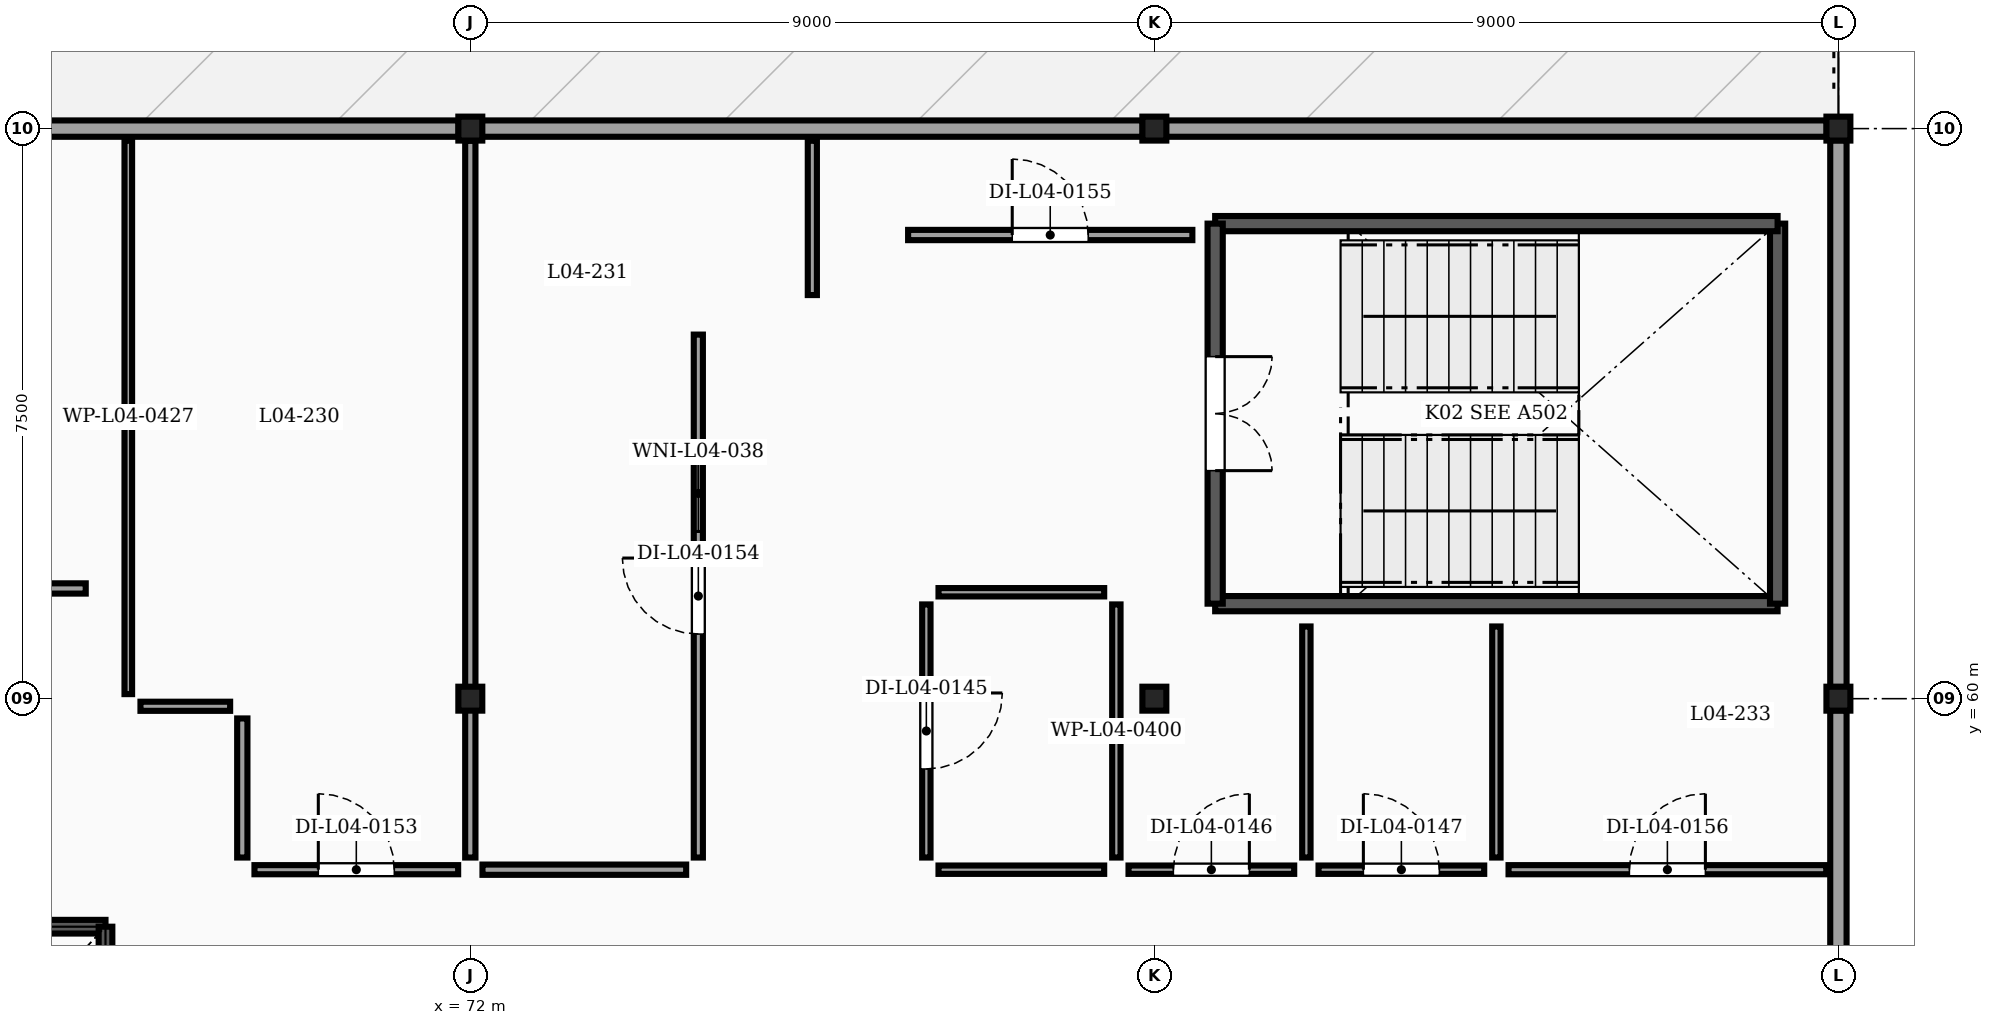
"""IFC4 building model, lengths in metres.
Left out: names, types, materials, properties, quantities, classifications, styles, units other than length and angle.
Written with IfcOpenShell. Run it as: python <this file> out.ifc"""

import sys

from ifc_helpers import new_model, si_unit, direction, frame, frame_2d, origin, origin_2d, place, context, subcontext, project, spatial, rectangle, extrude, element, fill, save


model = new_model("IFC4")
c1 = context("Model", 3, precision=1e-05, world=origin(), true_north=direction((0.0, 1.0)))
c2 = subcontext(c1, "Body", "Model", "MODEL_VIEW")
j1 = project(units=[si_unit("LENGTHUNIT", "METRE"), si_unit("PLANEANGLEUNIT", "RADIAN")], contexts=[c1])
p1 = place(None, origin())
s1 = spatial("IfcSite", under=j1, at=p1, CompositionType="ELEMENT")
p2 = place(p1, origin())
s2 = spatial("IfcBuilding", under=s1, at=p2, CompositionType="ELEMENT")
p3 = place(p2, frame((0.0, 0.0, 16.1)))
s3 = spatial("IfcBuildingStorey", under=s2, at=p3, CompositionType="ELEMENT", Elevation=16.1)
for number, where, z_axis, x_axis in (
    (1, (72.0, 60.0, 0.0), (0.0, 0.0, 1.0), (1.0, 0.0, 0.0)),
    (2, (81.0, 60.0, 0.0), (0.0, 0.0, 1.0), (1.0, 0.0, 0.0)),
    (3, (90.0, 60.0, 0.0), (0.0, 0.0, 1.0), (1.0, 0.0, 0.0)),
    (4, (72.0, 67.5, 0.0), (0.0, 0.0, 1.0), (1.0, 0.0, 0.0)),
    (5, (81.0, 67.5, 0.0), (0.0, 0.0, 1.0), (1.0, 0.0, 0.0)),
    (6, (90.0, 67.5, 0.0), (0.0, 0.0, 1.0), (1.0, 0.0, 0.0)),
):
    element("IfcColumn", number, at=place(p3, frame(where, z_axis=z_axis, x_axis=x_axis)), inside=s3, PredefinedType="COLUMN", context=c2, shape_type="SweptSolid", body=[
        extrude(rectangle(XDim=0.315, YDim=0.315, at=origin_2d()), origin(), (0.0, 0.0, 1.0), 3.8),
    ])
p4 = place(p3, frame((63.154, 67.5, 0.0), z_axis=(0.0, 0.0, 1.0), x_axis=(1.0, 0.0, 0.0)))
e7 = element("IfcWall", 7, at=p4, inside=s3, PredefinedType="SOLIDWALL", context=c2, shape_type="SweptSolid", body=[
    extrude(rectangle(XDim=8.693, YDim=0.215, at=frame_2d((4.346, 0.0))), origin(), (0.0, 0.0, 1.0), 3.017),
])
p5 = place(p4, frame((1.336, 0.0, 0.0)))
e8 = element("IfcOpeningElement", 8, at=p5, cuts=e7, PredefinedType="OPENING", context=c2, shape_type="SweptSolid", body=[
    extrude(rectangle(XDim=1.5, YDim=2.15, at=frame_2d((0.75, 1.075))), frame((0.0, 0.117, 0.0), z_axis=(0.0, -1.0, 0.0), x_axis=(1.0, 0.0, 0.0)), (0.0, 0.0, 1.0), 0.235),
])
for number, where, z_axis, x_axis in (
    (9, (72.154, 67.5, 0.0), (0.0, 0.0, 1.0), (1.0, 0.0, 0.0)),
    (10, (81.154, 67.5, 0.0), (0.0, 0.0, 1.0), (1.0, 0.0, 0.0)),
):
    element("IfcWall", number, at=place(p3, frame(where, z_axis=z_axis, x_axis=x_axis)), inside=s3, PredefinedType="SOLIDWALL", context=c2, shape_type="SweptSolid", body=[
        extrude(rectangle(XDim=8.693, YDim=0.215, at=frame_2d((4.346, 0.0))), origin(), (0.0, 0.0, 1.0), 3.017),
    ])
for number, where, z_axis, x_axis in (
    (11, (90.0, 67.346, 0.0), (0.0, 0.0, 1.0), (0.0, -1.0, 0.0)),
    (12, (90.0, 59.846, 0.0), (0.0, 0.0, 1.0), (0.0, -1.0, 0.0)),
):
    element("IfcWall", number, at=place(p3, frame(where, z_axis=z_axis, x_axis=x_axis)), inside=s3, PredefinedType="SOLIDWALL", context=c2, shape_type="SweptSolid", body=[
        extrude(rectangle(XDim=7.193, YDim=0.215, at=frame_2d((3.596, 0.0))), origin(), (0.0, 0.0, 1.0), 3.017),
    ])
p6 = place(p3, frame((81.8, 61.25, 0.0), z_axis=(0.0, 0.0, 1.0), x_axis=(1.0, 0.0, 0.0)))
e13 = element("IfcWall", 13, at=p6, inside=s3, PredefinedType="SHEAR", context=c2, shape_type="SweptSolid", body=[
    extrude(rectangle(XDim=7.4, YDim=0.2, at=frame_2d((3.7, 0.0))), origin(), (0.0, 0.0, 1.0), 3.61),
])
p7 = place(p3, frame((89.2, 61.25, 0.0), z_axis=(0.0, 0.0, 1.0), x_axis=(0.0, 1.0, 0.0)))
e14 = element("IfcWall", 14, at=p7, inside=s3, PredefinedType="SHEAR", context=c2, shape_type="SweptSolid", body=[
    extrude(rectangle(XDim=5.0, YDim=0.2, at=frame_2d((2.5, 0.0))), origin(), (0.0, 0.0, 1.0), 3.61),
])
p8 = place(p3, frame((89.2, 66.25, 0.0), z_axis=(0.0, 0.0, 1.0), x_axis=(-1.0, 0.0, 0.0)))
e15 = element("IfcWall", 15, at=p8, inside=s3, PredefinedType="SHEAR", context=c2, shape_type="SweptSolid", body=[
    extrude(rectangle(XDim=7.4, YDim=0.2, at=frame_2d((3.7, 0.0))), origin(), (0.0, 0.0, 1.0), 3.61),
])
p9 = place(p3, frame((81.8, 66.25, 0.0), z_axis=(0.0, 0.0, 1.0), x_axis=(0.0, -1.0, 0.0)))
e16 = element("IfcWall", 16, at=p9, inside=s3, PredefinedType="SHEAR", context=c2, shape_type="SweptSolid", body=[
    extrude(rectangle(XDim=5.0, YDim=0.2, at=frame_2d((2.5, 0.0))), origin(), (0.0, 0.0, 1.0), 3.61),
])
p10 = place(p9, frame((1.75, 0.0, 0.0)))
e17 = element("IfcOpeningElement", 17, at=p10, cuts=e16, PredefinedType="OPENING", context=c2, shape_type="SweptSolid", body=[
    extrude(rectangle(XDim=1.5, YDim=2.15, at=frame_2d((0.75, 1.075))), frame((0.0, 0.11, 0.0), z_axis=(0.0, -1.0, 0.0), x_axis=(1.0, 0.0, 0.0)), (0.0, 0.0, 1.0), 0.22),
])
p11 = place(p3, frame((64.4, 57.0, 0.0), z_axis=(0.0, 0.0, 1.0), x_axis=(1.0, 0.0, 0.0)))
e18 = element("IfcWall", 18, at=p11, inside=s3, PredefinedType="SHEAR", context=c2, shape_type="SweptSolid", body=[
    extrude(rectangle(XDim=2.8, YDim=0.18, at=frame_2d((1.4, 0.0))), origin(), (0.0, 0.0, 1.0), 3.61),
])
p12 = place(p11, frame((0.85, 0.0, 0.0)))
e19 = element("IfcOpeningElement", 19, at=p12, cuts=e18, PredefinedType="OPENING", context=c2, shape_type="SweptSolid", body=[
    extrude(rectangle(XDim=1.1, YDim=2.15, at=frame_2d((0.55, 1.075))), frame((0.0, 0.1, 0.0), z_axis=(0.0, -1.0, 0.0), x_axis=(1.0, 0.0, 0.0)), (0.0, 0.0, 1.0), 0.2),
])
p13 = place(p3, frame((67.2, 57.0, 0.0), z_axis=(0.0, 0.0, 1.0), x_axis=(0.0, -1.0, 0.0)))
e20 = element("IfcWall", 20, at=p13, inside=s3, PredefinedType="SHEAR", context=c2, shape_type="SweptSolid", body=[
    extrude(rectangle(XDim=3.0, YDim=0.18, at=frame_2d((1.5, 0.0))), origin(), (0.0, 0.0, 1.0), 3.61),
])
p14 = place(p3, frame((80.5, 57.91, 0.0), z_axis=(0.0, 0.0, 1.0), x_axis=(0.0, 1.0, 0.0)))
e21 = element("IfcWall", 21, at=p14, inside=s3, PredefinedType="PARTITIONING", context=c2, shape_type="SweptSolid", body=[
    extrude(rectangle(XDim=3.33, YDim=0.11, at=frame_2d((1.665, 0.0))), origin(), (0.0, 0.0, 1.0), 3.61),
])
p15 = place(p3, frame((78.0, 61.24, 0.0), z_axis=(0.0, 0.0, 1.0), x_axis=(0.0, -1.0, 0.0)))
e22 = element("IfcWall", 22, at=p15, inside=s3, PredefinedType="PARTITIONING", context=c2, shape_type="SweptSolid", body=[
    extrude(rectangle(XDim=3.33, YDim=0.11, at=frame_2d((1.665, 0.0))), origin(), (0.0, 0.0, 1.0), 3.302),
])
p16 = place(p15, frame((1.165, 0.0, 0.0)))
e23 = element("IfcOpeningElement", 23, at=p16, cuts=e22, PredefinedType="OPENING", context=c2, shape_type="SweptSolid", body=[
    extrude(rectangle(XDim=1.0, YDim=2.15, at=frame_2d((0.5, 1.075))), frame((0.0, 0.065, 0.0), z_axis=(0.0, -1.0, 0.0), x_axis=(1.0, 0.0, 0.0)), (0.0, 0.0, 1.0), 0.13),
])
for number, where, z_axis, x_axis in (
    (24, (80.34, 61.4, 0.0), (0.0, 0.0, 1.0), (-1.0, 0.0, 0.0)),
    (25, (78.16, 57.75, 0.0), (0.0, 0.0, 1.0), (1.0, 0.0, 0.0)),
):
    element("IfcWall", number, at=place(p3, frame(where, z_axis=z_axis, x_axis=x_axis)), inside=s3, PredefinedType="PARTITIONING", context=c2, shape_type="SweptSolid", body=[
        extrude(rectangle(XDim=2.18, YDim=0.11, at=frame_2d((1.09, 0.0))), origin(), (0.0, 0.0, 1.0), 3.61),
    ])
p17 = place(p3, frame((83.0, 57.91, 0.0), z_axis=(0.0, 0.0, 1.0), x_axis=(0.0, 1.0, 0.0)))
e26 = element("IfcWall", 26, at=p17, inside=s3, PredefinedType="PARTITIONING", context=c2, shape_type="SweptSolid", body=[
    extrude(rectangle(XDim=3.04, YDim=0.11, at=frame_2d((1.52, 0.0))), origin(), (0.0, 0.0, 1.0), 3.61),
])
p18 = place(p3, frame((80.66, 57.75, 0.0), z_axis=(0.0, 0.0, 1.0), x_axis=(1.0, 0.0, 0.0)))
e27 = element("IfcWall", 27, at=p18, inside=s3, PredefinedType="PARTITIONING", context=c2, shape_type="SweptSolid", body=[
    extrude(rectangle(XDim=2.18, YDim=0.11, at=frame_2d((1.09, 0.0))), origin(), (0.0, 0.0, 1.0), 3.61),
])
p19 = place(p18, frame((0.59, 0.0, 0.0)))
e28 = element("IfcOpeningElement", 28, at=p19, cuts=e27, PredefinedType="OPENING", context=c2, shape_type="SweptSolid", body=[
    extrude(rectangle(XDim=1.0, YDim=2.15, at=frame_2d((0.5, 1.075))), frame((0.0, 0.065, 0.0), z_axis=(0.0, -1.0, 0.0), x_axis=(1.0, 0.0, 0.0)), (0.0, 0.0, 1.0), 0.13),
])
p20 = place(p3, frame((83.16, 57.75, 0.0), z_axis=(0.0, 0.0, 1.0), x_axis=(1.0, 0.0, 0.0)))
e29 = element("IfcWall", 29, at=p20, inside=s3, PredefinedType="PARTITIONING", context=c2, shape_type="SweptSolid", body=[
    extrude(rectangle(XDim=2.18, YDim=0.11, at=frame_2d((1.09, 0.0))), origin(), (0.0, 0.0, 1.0), 3.61),
])
p21 = place(p20, frame((0.59, 0.0, 0.0)))
e30 = element("IfcOpeningElement", 30, at=p21, cuts=e29, PredefinedType="OPENING", context=c2, shape_type="SweptSolid", body=[
    extrude(rectangle(XDim=1.0, YDim=2.15, at=frame_2d((0.5, 1.075))), frame((0.0, 0.065, 0.0), z_axis=(0.0, -1.0, 0.0), x_axis=(1.0, 0.0, 0.0)), (0.0, 0.0, 1.0), 0.13),
])
p22 = place(p3, frame((85.5, 57.91, 0.0), z_axis=(0.0, 0.0, 1.0), x_axis=(0.0, 1.0, 0.0)))
e31 = element("IfcWall", 31, at=p22, inside=s3, PredefinedType="PARTITIONING", context=c2, shape_type="SweptSolid", body=[
    extrude(rectangle(XDim=3.04, YDim=0.11, at=frame_2d((1.52, 0.0))), origin(), (0.0, 0.0, 1.0), 3.61),
])
p23 = place(p3, frame((64.81, 61.45, 0.0), z_axis=(0.0, 0.0, 1.0), x_axis=(1.0, 0.0, 0.0)))
e32 = element("IfcWall", 32, at=p23, inside=s3, PredefinedType="PARTITIONING", context=c2, shape_type="SweptSolid", body=[
    extrude(rectangle(XDim=2.13, YDim=0.135, at=frame_2d((1.065, 0.0))), origin(), (0.0, 0.0, 1.0), 3.61),
])
p24 = place(p3, frame((67.66, 59.9, 0.0), z_axis=(0.0, 0.0, 1.0), x_axis=(1.0, 0.0, 0.0)))
e33 = element("IfcWall", 33, at=p24, inside=s3, PredefinedType="PARTITIONING", context=c2, shape_type="SweptSolid", body=[
    extrude(rectangle(XDim=1.18, YDim=0.12, at=frame_2d((0.59, 0.0))), origin(), (0.0, 0.0, 1.0), 3.082),
])
p25 = place(p3, frame((69.0, 59.74, 0.0), z_axis=(0.0, 0.0, 1.0), x_axis=(0.0, -1.0, 0.0)))
e34 = element("IfcWall", 34, at=p25, inside=s3, PredefinedType="PARTITIONING", context=c2, shape_type="SweptSolid", body=[
    extrude(rectangle(XDim=1.83, YDim=0.135, at=frame_2d((0.915, 0.0))), origin(), (0.0, 0.0, 1.0), 3.302),
])
p26 = place(p3, frame((69.16, 57.75, 0.0), z_axis=(0.0, 0.0, 1.0), x_axis=(1.0, 0.0, 0.0)))
e35 = element("IfcWall", 35, at=p26, inside=s3, PredefinedType="PARTITIONING", context=c2, shape_type="SweptSolid", body=[
    extrude(rectangle(XDim=2.68, YDim=0.12, at=frame_2d((1.34, 0.0))), origin(), (0.0, 0.0, 1.0), 3.61),
])
p27 = place(p26, frame((0.84, 0.0, 0.0)))
e36 = element("IfcOpeningElement", 36, at=p27, cuts=e35, PredefinedType="OPENING", context=c2, shape_type="SweptSolid", body=[
    extrude(rectangle(XDim=1.0, YDim=2.15, at=frame_2d((0.5, 1.075))), frame((0.0, 0.07, 0.0), z_axis=(0.0, -1.0, 0.0), x_axis=(1.0, 0.0, 0.0)), (0.0, 0.0, 1.0), 0.14),
])
p28 = place(p3, frame((72.16, 57.75, 0.0), z_axis=(0.0, 0.0, 1.0), x_axis=(1.0, 0.0, 0.0)))
e37 = element("IfcWall", 37, at=p28, inside=s3, PredefinedType="PARTITIONING", context=c2, shape_type="SweptSolid", body=[
    extrude(rectangle(XDim=2.68, YDim=0.135, at=frame_2d((1.34, 0.0))), origin(), (0.0, 0.0, 1.0), 3.61),
])
p29 = place(p3, frame((75.0, 57.91, 0.0), z_axis=(0.0, 0.0, 1.0), x_axis=(0.0, 1.0, 0.0)))
e38 = element("IfcWall", 38, at=p29, inside=s3, PredefinedType="PARTITIONING", context=c2, shape_type="SweptSolid", body=[
    extrude(rectangle(XDim=6.88, YDim=0.12, at=frame_2d((3.44, 0.0))), origin(), (0.0, 0.0, 1.0), 3.302),
])
p30 = place(p29, frame((2.94, 0.0, 0.0)))
e39 = element("IfcOpeningElement", 39, at=p30, cuts=e38, PredefinedType="OPENING", context=c2, shape_type="SweptSolid", body=[
    extrude(rectangle(XDim=1.0, YDim=2.15, at=frame_2d((0.5, 1.075))), frame((0.0, 0.07, 0.0), z_axis=(0.0, -1.0, 0.0), x_axis=(1.0, 0.0, 0.0)), (0.0, 0.0, 1.0), 0.14),
])
p31 = place(p29, frame((4.29, 0.0, 1.02)))
e40 = element("IfcOpeningElement", 40, at=p31, cuts=e38, PredefinedType="OPENING", context=c2, shape_type="SweptSolid", body=[
    extrude(rectangle(XDim=1.0, YDim=1.08, at=frame_2d((0.5, 0.54))), frame((0.0, 0.07, 0.0), z_axis=(0.0, -1.0, 0.0), x_axis=(1.0, 0.0, 0.0)), (0.0, 0.0, 1.0), 0.14),
])
p32 = place(p3, frame((77.76, 66.1, 0.0), z_axis=(0.0, 0.0, 1.0), x_axis=(1.0, 0.0, 0.0)))
e41 = element("IfcWall", 41, at=p32, inside=s3, PredefinedType="PARTITIONING", context=c2, shape_type="SweptSolid", body=[
    extrude(rectangle(XDim=3.74, YDim=0.135, at=frame_2d((1.87, 0.0))), origin(), (0.0, 0.0, 1.0), 3.61),
])
p33 = place(p32, frame((1.37, 0.0, 0.0)))
e42 = element("IfcOpeningElement", 42, at=p33, cuts=e41, PredefinedType="OPENING", context=c2, shape_type="SweptSolid", body=[
    extrude(rectangle(XDim=1.0, YDim=2.15, at=frame_2d((0.5, 1.075))), frame((0.0, 0.077, 0.0), z_axis=(0.0, -1.0, 0.0), x_axis=(1.0, 0.0, 0.0)), (0.0, 0.0, 1.0), 0.155),
])
p34 = place(p3, frame((85.66, 57.75, 0.0), z_axis=(0.0, 0.0, 1.0), x_axis=(1.0, 0.0, 0.0)))
e43 = element("IfcWall", 43, at=p34, inside=s3, PredefinedType="PARTITIONING", context=c2, shape_type="SweptSolid", body=[
    extrude(rectangle(XDim=4.18, YDim=0.12, at=frame_2d((2.09, 0.0))), origin(), (0.0, 0.0, 1.0), 3.61),
])
p35 = place(p34, frame((1.59, 0.0, 0.0)))
e44 = element("IfcOpeningElement", 44, at=p35, cuts=e43, PredefinedType="OPENING", context=c2, shape_type="SweptSolid", body=[
    extrude(rectangle(XDim=1.0, YDim=2.15, at=frame_2d((0.5, 1.075))), frame((0.0, 0.07, 0.0), z_axis=(0.0, -1.0, 0.0), x_axis=(1.0, 0.0, 0.0)), (0.0, 0.0, 1.0), 0.14),
])
p36 = place(p3, frame((67.5, 60.06, 0.0), z_axis=(0.0, 0.0, 1.0), x_axis=(0.0, 1.0, 0.0)))
e45 = element("IfcWall", 45, at=p36, inside=s3, PredefinedType="PARTITIONING", context=c2, shape_type="SweptSolid", body=[
    extrude(rectangle(XDim=7.28, YDim=0.1, at=frame_2d((3.64, 0.0))), origin(), (0.0, 0.0, 1.0), 3.61),
])
p37 = place(p3, frame((72.0, 57.91, 0.0), z_axis=(0.0, 0.0, 1.0), x_axis=(0.0, 1.0, 0.0)))
e46 = element("IfcWall", 46, at=p37, inside=s3, PredefinedType="PARTITIONING", context=c2, shape_type="SweptSolid", body=[
    extrude(rectangle(XDim=9.43, YDim=0.135, at=frame_2d((4.715, 0.0))), origin(), (0.0, 0.0, 1.0), 3.082),
])
p38 = place(p3, frame((76.5, 65.31, 0.0), z_axis=(0.0, 0.0, 1.0), x_axis=(0.0, 1.0, 0.0)))
e47 = element("IfcWall", 47, at=p38, inside=s3, PredefinedType="PARTITIONING", context=c2, shape_type="SweptSolid", body=[
    extrude(rectangle(XDim=2.03, YDim=0.12, at=frame_2d((1.015, 0.0))), origin(), (0.0, 0.0, 1.0), 3.61),
])
p39 = place(p10, origin())
e48 = element("IfcDoor", 48, at=p39, inside=s3, OperationType="DOUBLE_DOOR_SINGLE_SWING", PredefinedType="DOOR", context=c2, shape_type="SweptSolid", body=[
    extrude(rectangle(XDim=1.5, YDim=2.15, at=frame_2d((0.75, 1.075))), frame((0.0, 0.025, 0.0), z_axis=(0.0, -1.0, 0.0), x_axis=(1.0, 0.0, 0.0)), (0.0, 0.0, 1.0), 0.05),
])
fill(e17, e48)
p40 = place(p16, origin())
e49 = element("IfcDoor", 49, at=p40, inside=s3, OperationType="SINGLE_SWING_LEFT", PredefinedType="DOOR", context=c2, shape_type="SweptSolid", body=[
    extrude(rectangle(XDim=1.0, YDim=2.15, at=frame_2d((0.5, 1.075))), frame((0.0, 0.025, 0.0), z_axis=(0.0, -1.0, 0.0), x_axis=(1.0, 0.0, 0.0)), (0.0, 0.0, 1.0), 0.05),
])
fill(e23, e49)
p41 = place(p19, origin())
e50 = element("IfcDoor", 50, at=p41, inside=s3, OperationType="SINGLE_SWING_RIGHT", PredefinedType="DOOR", context=c2, shape_type="SweptSolid", body=[
    extrude(rectangle(XDim=1.0, YDim=2.15, at=frame_2d((0.5, 1.075))), frame((0.0, 0.025, 0.0), z_axis=(0.0, -1.0, 0.0), x_axis=(1.0, 0.0, 0.0)), (0.0, 0.0, 1.0), 0.05),
])
fill(e28, e50)
p42 = place(p21, origin())
e51 = element("IfcDoor", 51, at=p42, inside=s3, OperationType="SINGLE_SWING_LEFT", PredefinedType="DOOR", context=c2, shape_type="SweptSolid", body=[
    extrude(rectangle(XDim=1.0, YDim=2.15, at=frame_2d((0.5, 1.075))), frame((0.0, 0.025, 0.0), z_axis=(0.0, -1.0, 0.0), x_axis=(1.0, 0.0, 0.0)), (0.0, 0.0, 1.0), 0.05),
])
fill(e30, e51)
p43 = place(p27, origin())
e52 = element("IfcDoor", 52, at=p43, inside=s3, OperationType="SINGLE_SWING_LEFT", PredefinedType="DOOR", context=c2, shape_type="SweptSolid", body=[
    extrude(rectangle(XDim=1.0, YDim=2.15, at=frame_2d((0.5, 1.075))), frame((0.0, 0.025, 0.0), z_axis=(0.0, -1.0, 0.0), x_axis=(1.0, 0.0, 0.0)), (0.0, 0.0, 1.0), 0.05),
])
fill(e36, e52)
p44 = place(p30, origin())
e53 = element("IfcDoor", 53, at=p44, inside=s3, OperationType="SINGLE_SWING_RIGHT", PredefinedType="DOOR", context=c2, shape_type="SweptSolid", body=[
    extrude(rectangle(XDim=1.0, YDim=2.15, at=frame_2d((0.5, 1.075))), frame((0.0, 0.025, 0.0), z_axis=(0.0, -1.0, 0.0), x_axis=(1.0, 0.0, 0.0)), (0.0, 0.0, 1.0), 0.05),
])
fill(e39, e53)
p45 = place(p31, origin())
e54 = element("IfcWindow", 54, at=p45, inside=s3, PartitioningType="DOUBLE_PANEL_VERTICAL", PredefinedType="WINDOW", context=c2, shape_type="SweptSolid", body=[
    extrude(rectangle(XDim=1.0, YDim=1.08, at=frame_2d((0.5, 0.54))), frame((0.0, 0.03, 0.0), z_axis=(0.0, -1.0, 0.0), x_axis=(1.0, 0.0, 0.0)), (0.0, 0.0, 1.0), 0.06),
])
fill(e40, e54)
p46 = place(p33, origin())
e55 = element("IfcDoor", 55, at=p46, inside=s3, OperationType="SINGLE_SWING_LEFT", PredefinedType="DOOR", context=c2, shape_type="SweptSolid", body=[
    extrude(rectangle(XDim=1.0, YDim=2.15, at=frame_2d((0.5, 1.075))), frame((0.0, 0.025, 0.0), z_axis=(0.0, -1.0, 0.0), x_axis=(1.0, 0.0, 0.0)), (0.0, 0.0, 1.0), 0.05),
])
fill(e42, e55)
p47 = place(p35, origin())
e56 = element("IfcDoor", 56, at=p47, inside=s3, OperationType="SINGLE_SWING_RIGHT", PredefinedType="DOOR", context=c2, shape_type="SweptSolid", body=[
    extrude(rectangle(XDim=1.0, YDim=2.15, at=frame_2d((0.5, 1.075))), frame((0.0, 0.025, 0.0), z_axis=(0.0, -1.0, 0.0), x_axis=(1.0, 0.0, 0.0)), (0.0, 0.0, 1.0), 0.05),
])
fill(e44, e56)
save(model, sys.argv[1])
